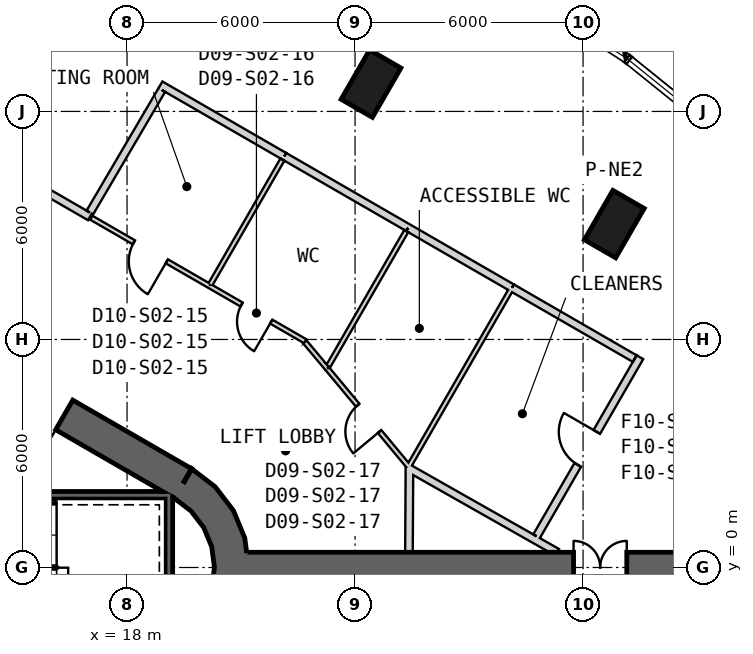
"""IFC4 building model, lengths in metres.
Left out: names, types, materials, properties, quantities, classifications, styles, units other than length and angle.
Written with IfcOpenShell. Run it as: python <this file> out.ifc"""

import sys

from ifc_helpers import new_model, si_unit, direction, frame, frame_2d, origin, origin_2d, place, context, subcontext, project, spatial, polyline, rectangle, outline, extrude, element, fill, save


model = new_model("IFC4")
c1 = context("Model", 3, precision=1e-05, world=origin(), true_north=direction((0.0, 1.0)))
c2 = subcontext(c1, "Body", "Model", "MODEL_VIEW")
j1 = project(units=[si_unit("LENGTHUNIT", "METRE"), si_unit("PLANEANGLEUNIT", "RADIAN")], contexts=[c1])
p1 = place(None, origin())
s1 = spatial("IfcSite", under=j1, at=p1, CompositionType="ELEMENT")
p2 = place(p1, origin())
s2 = spatial("IfcBuilding", under=s1, at=p2, CompositionType="ELEMENT")
p3 = place(p2, frame((0.0, 0.0, 70.1)))
s3 = spatial("IfcBuildingStorey", under=s2, at=p3, CompositionType="ELEMENT", Elevation=70.1)
for number, where, z_axis, x_axis in (
    (1, (30.821, 9.035, 0.0), (0.0, 0.0, 1.0), (0.5, 0.866, 0.0)),
    (2, (24.42, 12.731, 0.0), (0.0, 0.0, 1.0), (0.5, 0.866, 0.0)),
):
    element("IfcColumn", number, at=place(p3, frame(where, z_axis=z_axis, x_axis=x_axis)), inside=s3, PredefinedType="COLUMN", context=c2, shape_type="SweptSolid", body=[
        extrude(rectangle(XDim=1.5, YDim=0.95, at=origin_2d()), origin(), (0.0, 0.0, 1.0), 4.1),
    ])
p4 = place(p3, frame((19.475, 2.208, 0.0), z_axis=(0.0, 0.0, 1.0), x_axis=(-0.866028369851, 0.499994862586, 0.0)))
e3 = element("IfcWall", 3, at=p4, inside=s3, PredefinedType="SHEAR", context=c2, shape_type="SweptSolid", body=[
    extrude(rectangle(XDim=31.523, YDim=0.9, at=frame_2d((15.762, 0.0))), origin(), (0.0, 0.0, 1.0), 4.1),
])
p5 = place(p4, frame((7.062, 0.0, 0.0)))
e4 = element("IfcOpeningElement", 4, at=p5, cuts=e3, PredefinedType="OPENING", context=c2, shape_type="SweptSolid", body=[
    extrude(rectangle(XDim=1.2, YDim=2.4, at=frame_2d((0.6, 1.2))), frame((0.0, 0.46, 0.0), z_axis=(0.0, -1.0, 0.0), x_axis=(1.0, 0.0, 0.0)), (0.0, 0.0, 1.0), 0.92),
])
p6 = place(p4, frame((9.762, 0.0, 0.0)))
e5 = element("IfcOpeningElement", 5, at=p6, cuts=e3, PredefinedType="OPENING", context=c2, shape_type="SweptSolid", body=[
    extrude(rectangle(XDim=1.2, YDim=2.4, at=frame_2d((0.6, 1.2))), frame((0.0, 0.46, 0.0), z_axis=(0.0, -1.0, 0.0), x_axis=(1.0, 0.0, 0.0)), (0.0, 0.0, 1.0), 0.92),
])
p7 = place(p4, frame((12.462, 0.0, 0.0)))
e6 = element("IfcOpeningElement", 6, at=p7, cuts=e3, PredefinedType="OPENING", context=c2, shape_type="SweptSolid", body=[
    extrude(rectangle(XDim=1.2, YDim=2.4, at=frame_2d((0.6, 1.2))), frame((0.0, 0.46, 0.0), z_axis=(0.0, -1.0, 0.0), x_axis=(1.0, 0.0, 0.0)), (0.0, 0.0, 1.0), 0.92),
])
p8 = place(p4, frame((15.162, 0.0, 0.0)))
e7 = element("IfcOpeningElement", 7, at=p8, cuts=e3, PredefinedType="OPENING", context=c2, shape_type="SweptSolid", body=[
    extrude(rectangle(XDim=1.2, YDim=2.4, at=frame_2d((0.6, 1.2))), frame((0.0, 0.46, 0.0), z_axis=(0.0, -1.0, 0.0), x_axis=(1.0, 0.0, 0.0)), (0.0, 0.0, 1.0), 0.92),
])
p9 = place(p4, frame((17.862, 0.0, 0.0)))
e8 = element("IfcOpeningElement", 8, at=p9, cuts=e3, PredefinedType="OPENING", context=c2, shape_type="SweptSolid", body=[
    extrude(rectangle(XDim=1.2, YDim=2.4, at=frame_2d((0.6, 1.2))), frame((0.0, 0.46, 0.0), z_axis=(0.0, -1.0, 0.0), x_axis=(1.0, 0.0, 0.0)), (0.0, 0.0, 1.0), 0.92),
])
p10 = place(p4, frame((20.562, 0.0, 0.0)))
e9 = element("IfcOpeningElement", 9, at=p10, cuts=e3, PredefinedType="OPENING", context=c2, shape_type="SweptSolid", body=[
    extrude(rectangle(XDim=1.2, YDim=2.4, at=frame_2d((0.6, 1.2))), frame((0.0, 0.46, 0.0), z_axis=(0.0, -1.0, 0.0), x_axis=(1.0, 0.0, 0.0)), (0.0, 0.0, 1.0), 0.92),
])
p11 = place(p4, frame((23.262, 0.0, 0.0)))
e10 = element("IfcOpeningElement", 10, at=p11, cuts=e3, PredefinedType="OPENING", context=c2, shape_type="SweptSolid", body=[
    extrude(rectangle(XDim=1.2, YDim=2.4, at=frame_2d((0.6, 1.2))), frame((0.0, 0.46, 0.0), z_axis=(0.0, -1.0, 0.0), x_axis=(1.0, 0.0, 0.0)), (0.0, 0.0, 1.0), 0.92),
])
p12 = place(p4, frame((3.612, 0.0, 0.0)))
e11 = element("IfcOpeningElement", 11, at=p12, cuts=e3, PredefinedType="OPENING", context=c2, shape_type="SweptSolid", body=[
    extrude(rectangle(XDim=1.2, YDim=2.4, at=frame_2d((0.6, 1.2))), frame((0.0, 0.46, 0.0), z_axis=(0.0, -1.0, 0.0), x_axis=(1.0, 0.0, 0.0)), (0.0, 0.0, 1.0), 0.92),
])
p13 = place(p4, frame((26.712, 0.0, 0.0)))
e12 = element("IfcOpeningElement", 12, at=p13, cuts=e3, PredefinedType="OPENING", context=c2, shape_type="SweptSolid", body=[
    extrude(rectangle(XDim=1.2, YDim=2.4, at=frame_2d((0.6, 1.2))), frame((0.0, 0.46, 0.0), z_axis=(0.0, -1.0, 0.0), x_axis=(1.0, 0.0, 0.0)), (0.0, 0.0, 1.0), 0.92),
])
p14 = place(p3, origin())
e13 = element("IfcWall", 13, at=p14, inside=s3, PredefinedType="SHEAR", context=c2, shape_type="SweptSolid", body=[
    extrude(outline(polyline([(19.7, -2.598), (20.321, -2.121), (20.798, -1.5), (21.098, -0.777), (21.2, 0.0), (21.098, 0.777), (20.798, 1.5), (20.321, 2.121), (19.7, 2.598), (19.25, 1.819), (19.685, 1.485), (20.019, 1.05), (20.229, 0.543), (20.3, 0.0), (20.229, -0.543), (20.019, -1.05), (19.685, -1.485), (19.25, -1.819), (19.7, -2.598)])), origin(), (0.0, 0.0, 1.0), 4.1),
])
p15 = place(p3, frame((21.15, 0.0, 0.0), z_axis=(0.0, 0.0, 1.0), x_axis=(1.0, 0.0, 0.0)))
e14 = element("IfcWall", 14, at=p15, inside=s3, PredefinedType="SHEAR", context=c2, shape_type="SweptSolid", body=[
    extrude(rectangle(XDim=13.67, YDim=0.8, at=frame_2d((6.835, 0.0))), origin(), (0.0, 0.0, 1.0), 4.1),
])
p16 = place(p15, frame((8.6, 0.0, 0.0)))
e15 = element("IfcOpeningElement", 15, at=p16, cuts=e14, PredefinedType="OPENING", context=c2, shape_type="SweptSolid", body=[
    extrude(rectangle(XDim=1.4, YDim=2.4, at=frame_2d((0.7, 1.2))), frame((0.0, 0.41, 0.0), z_axis=(0.0, -1.0, 0.0), x_axis=(1.0, 0.0, 0.0)), (0.0, 0.0, 1.0), 0.82),
])
p17 = place(p3, frame((19.2, 1.9, -0.3), z_axis=(0.0, 0.0, 1.0), x_axis=(-1.0, 0.0, 0.0)))
e16 = element("IfcWall", 16, at=p17, inside=s3, PredefinedType="SHEAR", context=c2, shape_type="SweptSolid", body=[
    extrude(rectangle(XDim=8.1, YDim=0.2, at=frame_2d((4.05, 0.0))), origin(), (0.0, 0.0, 1.0), 4.1),
])
p18 = place(p3, frame((19.1, -2.0, -0.3), z_axis=(0.0, 0.0, 1.0), x_axis=(0.0, 1.0, 0.0)))
e17 = element("IfcWall", 17, at=p18, inside=s3, PredefinedType="SHEAR", context=c2, shape_type="SweptSolid", body=[
    extrude(rectangle(XDim=3.8, YDim=0.2, at=frame_2d((1.9, 0.0))), origin(), (0.0, 0.0, 1.0), 4.1),
])
p19 = place(p3, frame((17.023, 9.224, 0.0), z_axis=(0.0, 0.0, 1.0), x_axis=(-0.866024925705, 0.500000828058, 0.0)))
e18 = element("IfcWall", 18, at=p19, inside=s3, PredefinedType="PARTITIONING", context=c2, shape_type="SweptSolid", body=[
    extrude(rectangle(XDim=26.647, YDim=0.2, at=frame_2d((13.323, 0.0))), origin(), (0.0, 0.0, 1.0), 2.98),
])
p20 = place(p19, frame((12.823, 0.0, 0.0)))
e19 = element("IfcOpeningElement", 19, at=p20, cuts=e18, PredefinedType="OPENING", context=c2, shape_type="SweptSolid", body=[
    extrude(rectangle(XDim=1.0, YDim=2.1, at=frame_2d((0.5, 1.05))), frame((0.0, 0.11, 0.0), z_axis=(0.0, -1.0, 0.0), x_axis=(1.0, 0.0, 0.0)), (0.0, 0.0, 1.0), 0.22),
])
p21 = place(p3, frame((25.418, 0.4, 0.0), z_axis=(0.0, 0.0, 1.0), x_axis=(0.005737699208, 0.999983539268, 0.0)))
e20 = element("IfcWall", 20, at=p21, inside=s3, PredefinedType="PARTITIONING", context=c2, shape_type="SweptSolid", body=[
    extrude(rectangle(XDim=2.255, YDim=0.2, at=frame_2d((1.127, 0.0))), origin(), (0.0, 0.0, 1.0), 3.8),
])
p22 = place(p3, frame((22.693, 5.951, 0.0), z_axis=(0.0, 0.0, 1.0), x_axis=(-0.866027933502, 0.499995618375, 0.0)))
e21 = element("IfcWall", 21, at=p22, inside=s3, PredefinedType="PARTITIONING", context=c2, shape_type="SweptSolid", body=[
    extrude(rectangle(XDim=2.914, YDim=0.12, at=frame_2d((1.457, 0.0))), origin(), (0.0, 0.0, 1.0), 2.98),
])
p23 = place(p22, frame((1.037, 0.0, 0.0)))
e22 = element("IfcOpeningElement", 22, at=p23, cuts=e21, PredefinedType="OPENING", context=c2, shape_type="SweptSolid", body=[
    extrude(rectangle(XDim=0.9, YDim=2.1, at=frame_2d((0.45, 1.05))), frame((0.0, 0.07, 0.0), z_axis=(0.0, -1.0, 0.0), x_axis=(1.0, 0.0, 0.0)), (0.0, 0.0, 1.0), 0.14),
])
p24 = place(p3, frame((20.169, 7.408, 0.0), z_axis=(0.0, 0.0, 1.0), x_axis=(-0.866035089317, 0.49998322379, 0.0)))
e23 = element("IfcWall", 23, at=p24, inside=s3, PredefinedType="PARTITIONING", context=c2, shape_type="SweptSolid", body=[
    extrude(rectangle(XDim=3.593, YDim=0.12, at=frame_2d((1.796, 0.0))), origin(), (0.0, 0.0, 1.0), 3.08),
])
p25 = place(p24, frame((1.296, 0.0, 0.0)))
e24 = element("IfcOpeningElement", 24, at=p25, cuts=e23, PredefinedType="OPENING", context=c2, shape_type="SweptSolid", body=[
    extrude(rectangle(XDim=1.0, YDim=2.1, at=frame_2d((0.5, 1.05))), frame((0.0, 0.07, 0.0), z_axis=(0.0, -1.0, 0.0), x_axis=(1.0, 0.0, 0.0)), (0.0, 0.0, 1.0), 0.14),
])
p26 = place(p3, frame((23.269, 5.232, 0.0), z_axis=(0.0, 0.0, 1.0), x_axis=(-0.642823857783, 0.766014025893, 0.0)))
e25 = element("IfcWall", 25, at=p26, inside=s3, PredefinedType="PARTITIONING", context=c2, shape_type="SweptSolid", body=[
    extrude(rectangle(XDim=0.917, YDim=0.12, at=frame_2d((0.459, 0.0))), origin(), (0.0, 0.0, 1.0), 3.8),
])
p27 = place(p3, frame((25.446, 2.615, 0.0), z_axis=(0.0, 0.0, 1.0), x_axis=(-0.63946471851, 0.768820443134, 0.0)))
e26 = element("IfcWall", 26, at=p27, inside=s3, PredefinedType="PARTITIONING", context=c2, shape_type="SweptSolid", body=[
    extrude(rectangle(XDim=3.405, YDim=0.12, at=frame_2d((1.702, 0.0))), origin(), (0.0, 0.0, 1.0), 2.88),
])
p28 = place(p27, frame((1.252, 0.0, 0.0)))
e27 = element("IfcOpeningElement", 27, at=p28, cuts=e26, PredefinedType="OPENING", context=c2, shape_type="SweptSolid", body=[
    extrude(rectangle(XDim=0.9, YDim=2.1, at=frame_2d((0.45, 1.05))), frame((0.0, 0.07, 0.0), z_axis=(0.0, -1.0, 0.0), x_axis=(1.0, 0.0, 0.0)), (0.0, 0.0, 1.0), 0.14),
])
p29 = place(p3, frame((18.88, 12.702, 0.0), z_axis=(0.0, 0.0, 1.0), x_axis=(0.865994330033, -0.500053817454, 0.0)))
e28 = element("IfcWall", 28, at=p29, inside=s3, PredefinedType="PARTITIONING", context=c2, shape_type="SweptSolid", body=[
    extrude(rectangle(XDim=3.763, YDim=0.2, at=frame_2d((1.881, 0.0))), origin(), (0.0, 0.0, 1.0), 3.08),
])
p30 = place(p3, frame((22.139, 10.82, 0.0), z_axis=(0.0, 0.0, 1.0), x_axis=(0.866026773083, -0.499997628298, 0.0)))
e29 = element("IfcWall", 29, at=p30, inside=s3, PredefinedType="PARTITIONING", context=c2, shape_type="SweptSolid", body=[
    extrude(rectangle(XDim=3.763, YDim=0.2, at=frame_2d((1.882, 0.0))), origin(), (0.0, 0.0, 1.0), 3.8),
])
p31 = place(p3, frame((25.398, 8.938, 0.0), z_axis=(0.0, 0.0, 1.0), x_axis=(0.86602447079, -0.500001615989, 0.0)))
e30 = element("IfcWall", 30, at=p31, inside=s3, PredefinedType="PARTITIONING", context=c2, shape_type="SweptSolid", body=[
    extrude(rectangle(XDim=3.154, YDim=0.2, at=frame_2d((1.577, 0.0))), origin(), (0.0, 0.0, 1.0), 2.98),
])
p32 = place(p3, frame((28.13, 7.361, 0.0), z_axis=(0.0, 0.0, 1.0), x_axis=(0.866035156036, -0.499983108224, 0.0)))
e31 = element("IfcWall", 31, at=p32, inside=s3, PredefinedType="PARTITIONING", context=c2, shape_type="SweptSolid", body=[
    extrude(rectangle(XDim=3.73, YDim=0.2, at=frame_2d((1.865, 0.0))), origin(), (0.0, 0.0, 1.0), 3.8),
])
p33 = place(p3, frame((17.021, 9.341, 0.0), z_axis=(0.0, 0.0, 1.0), x_axis=(0.506583621903, 0.862190833876, 0.0)))
e32 = element("IfcWall", 32, at=p33, inside=s3, PredefinedType="PARTITIONING", context=c2, shape_type="SweptSolid", body=[
    extrude(rectangle(XDim=3.74, YDim=0.2, at=frame_2d((1.87, 0.0))), origin(), (0.0, 0.0, 1.0), 3.8),
])
p34 = place(p3, frame((25.446, 2.594, 0.0), z_axis=(0.0, 0.0, 1.0), x_axis=(0.869969631216, -0.493105303928, 0.0)))
e33 = element("IfcWall", 33, at=p34, inside=s3, PredefinedType="PARTITIONING", context=c2, shape_type="SweptSolid", body=[
    extrude(rectangle(XDim=4.45, YDim=0.2, at=frame_2d((2.225, 0.0))), origin(), (0.0, 0.0, 1.0), 3.8),
])
p35 = place(p3, frame((28.776, 0.822, 0.0), z_axis=(0.0, 0.0, 1.0), x_axis=(0.499995686755, 0.866027894023, 0.0)))
e34 = element("IfcWall", 34, at=p35, inside=s3, PredefinedType="PARTITIONING", context=c2, shape_type="SweptSolid", body=[
    extrude(rectangle(XDim=5.44, YDim=0.2, at=frame_2d((2.72, 0.0))), origin(), (0.0, 0.0, 1.0), 2.88),
])
p36 = place(p35, frame((2.17, 0.0, 0.0)))
e35 = element("IfcOpeningElement", 35, at=p36, cuts=e34, PredefinedType="OPENING", context=c2, shape_type="SweptSolid", body=[
    extrude(rectangle(XDim=1.0, YDim=2.1, at=frame_2d((0.5, 1.05))), frame((0.0, 0.11, 0.0), z_axis=(0.0, -1.0, 0.0), x_axis=(1.0, 0.0, 0.0)), (0.0, 0.0, 1.0), 0.22),
])
p37 = place(p3, frame((22.089, 10.734, 0.0), z_axis=(0.0, 0.0, 1.0), x_axis=(-0.499966587594, -0.866044693586, 0.0)))
e36 = element("IfcWall", 36, at=p37, inside=s3, PredefinedType="PARTITIONING", context=c2, shape_type="SweptSolid", body=[
    extrude(rectangle(XDim=3.78, YDim=0.12, at=frame_2d((1.89, 0.0))), origin(), (0.0, 0.0, 1.0), 3.8),
])
p38 = place(p3, frame((25.348, 8.852, 0.0), z_axis=(0.0, 0.0, 1.0), x_axis=(-0.500051773299, -0.865995510393, 0.0)))
e37 = element("IfcWall", 37, at=p38, inside=s3, PredefinedType="PARTITIONING", context=c2, shape_type="SweptSolid", body=[
    extrude(rectangle(XDim=4.107, YDim=0.12, at=frame_2d((2.053, 0.0))), origin(), (0.0, 0.0, 1.0), 2.98),
])
p39 = place(p3, frame((28.08, 7.275, 0.0), z_axis=(0.0, 0.0, 1.0), x_axis=(-0.499984685083, -0.866034245675, 0.0)))
e38 = element("IfcWall", 38, at=p39, inside=s3, PredefinedType="PARTITIONING", context=c2, shape_type="SweptSolid", body=[
    extrude(rectangle(XDim=5.319, YDim=0.12, at=frame_2d((2.66, 0.0))), origin(), (0.0, 0.0, 1.0), 2.88),
])
p40 = place(p25, origin())
e39 = element("IfcDoor", 39, at=p40, inside=s3, OperationType="SINGLE_SWING_RIGHT", PredefinedType="NOTDEFINED", context=c2, shape_type="SweptSolid", body=[
    extrude(rectangle(XDim=1.0, YDim=2.1, at=frame_2d((0.5, 1.05))), frame((0.0, 0.025, 0.0), z_axis=(0.0, -1.0, 0.0), x_axis=(1.0, 0.0, 0.0)), (0.0, 0.0, 1.0), 0.05),
])
fill(e24, e39)
p41 = place(p23, origin())
e40 = element("IfcDoor", 40, at=p41, inside=s3, OperationType="SINGLE_SWING_LEFT", PredefinedType="NOTDEFINED", context=c2, shape_type="SweptSolid", body=[
    extrude(rectangle(XDim=0.9, YDim=2.1, at=frame_2d((0.45, 1.05))), frame((0.0, 0.025, 0.0), z_axis=(0.0, -1.0, 0.0), x_axis=(1.0, 0.0, 0.0)), (0.0, 0.0, 1.0), 0.05),
])
fill(e22, e40)
p42 = place(p28, origin())
e41 = element("IfcDoor", 41, at=p42, inside=s3, OperationType="SINGLE_SWING_RIGHT", PredefinedType="NOTDEFINED", context=c2, shape_type="SweptSolid", body=[
    extrude(rectangle(XDim=0.9, YDim=2.1, at=frame_2d((0.45, 1.05))), frame((0.0, 0.025, 0.0), z_axis=(0.0, -1.0, 0.0), x_axis=(1.0, 0.0, 0.0)), (0.0, 0.0, 1.0), 0.05),
])
fill(e27, e41)
p43 = place(p36, origin())
e42 = element("IfcDoor", 42, at=p43, inside=s3, OperationType="SINGLE_SWING_RIGHT", PredefinedType="USERDEFINED", context=c2, shape_type="SweptSolid", body=[
    extrude(rectangle(XDim=1.0, YDim=2.1, at=frame_2d((0.5, 1.05))), frame((0.0, 0.025, 0.0), z_axis=(0.0, -1.0, 0.0), x_axis=(1.0, 0.0, 0.0)), (0.0, 0.0, 1.0), 0.05),
])
fill(e35, e42)
p44 = place(p12, origin())
e43 = element("IfcDoor", 43, at=p44, inside=s3, OperationType="SINGLE_SWING_LEFT", PredefinedType="USERDEFINED", context=c2, shape_type="SweptSolid", body=[
    extrude(rectangle(XDim=1.2, YDim=2.4, at=frame_2d((0.6, 1.2))), frame((0.0, 0.025, 0.0), z_axis=(0.0, -1.0, 0.0), x_axis=(1.0, 0.0, 0.0)), (0.0, 0.0, 1.0), 0.05),
])
fill(e11, e43)
p45 = place(p16, origin())
e44 = element("IfcDoor", 44, at=p45, inside=s3, OperationType="DOUBLE_DOOR_SINGLE_SWING", PredefinedType="NOTDEFINED", context=c2, shape_type="SweptSolid", body=[
    extrude(rectangle(XDim=1.4, YDim=2.4, at=frame_2d((0.7, 1.2))), frame((0.0, 0.025, 0.0), z_axis=(0.0, -1.0, 0.0), x_axis=(1.0, 0.0, 0.0)), (0.0, 0.0, 1.0), 0.05),
])
fill(e15, e44)
save(model, sys.argv[1])
